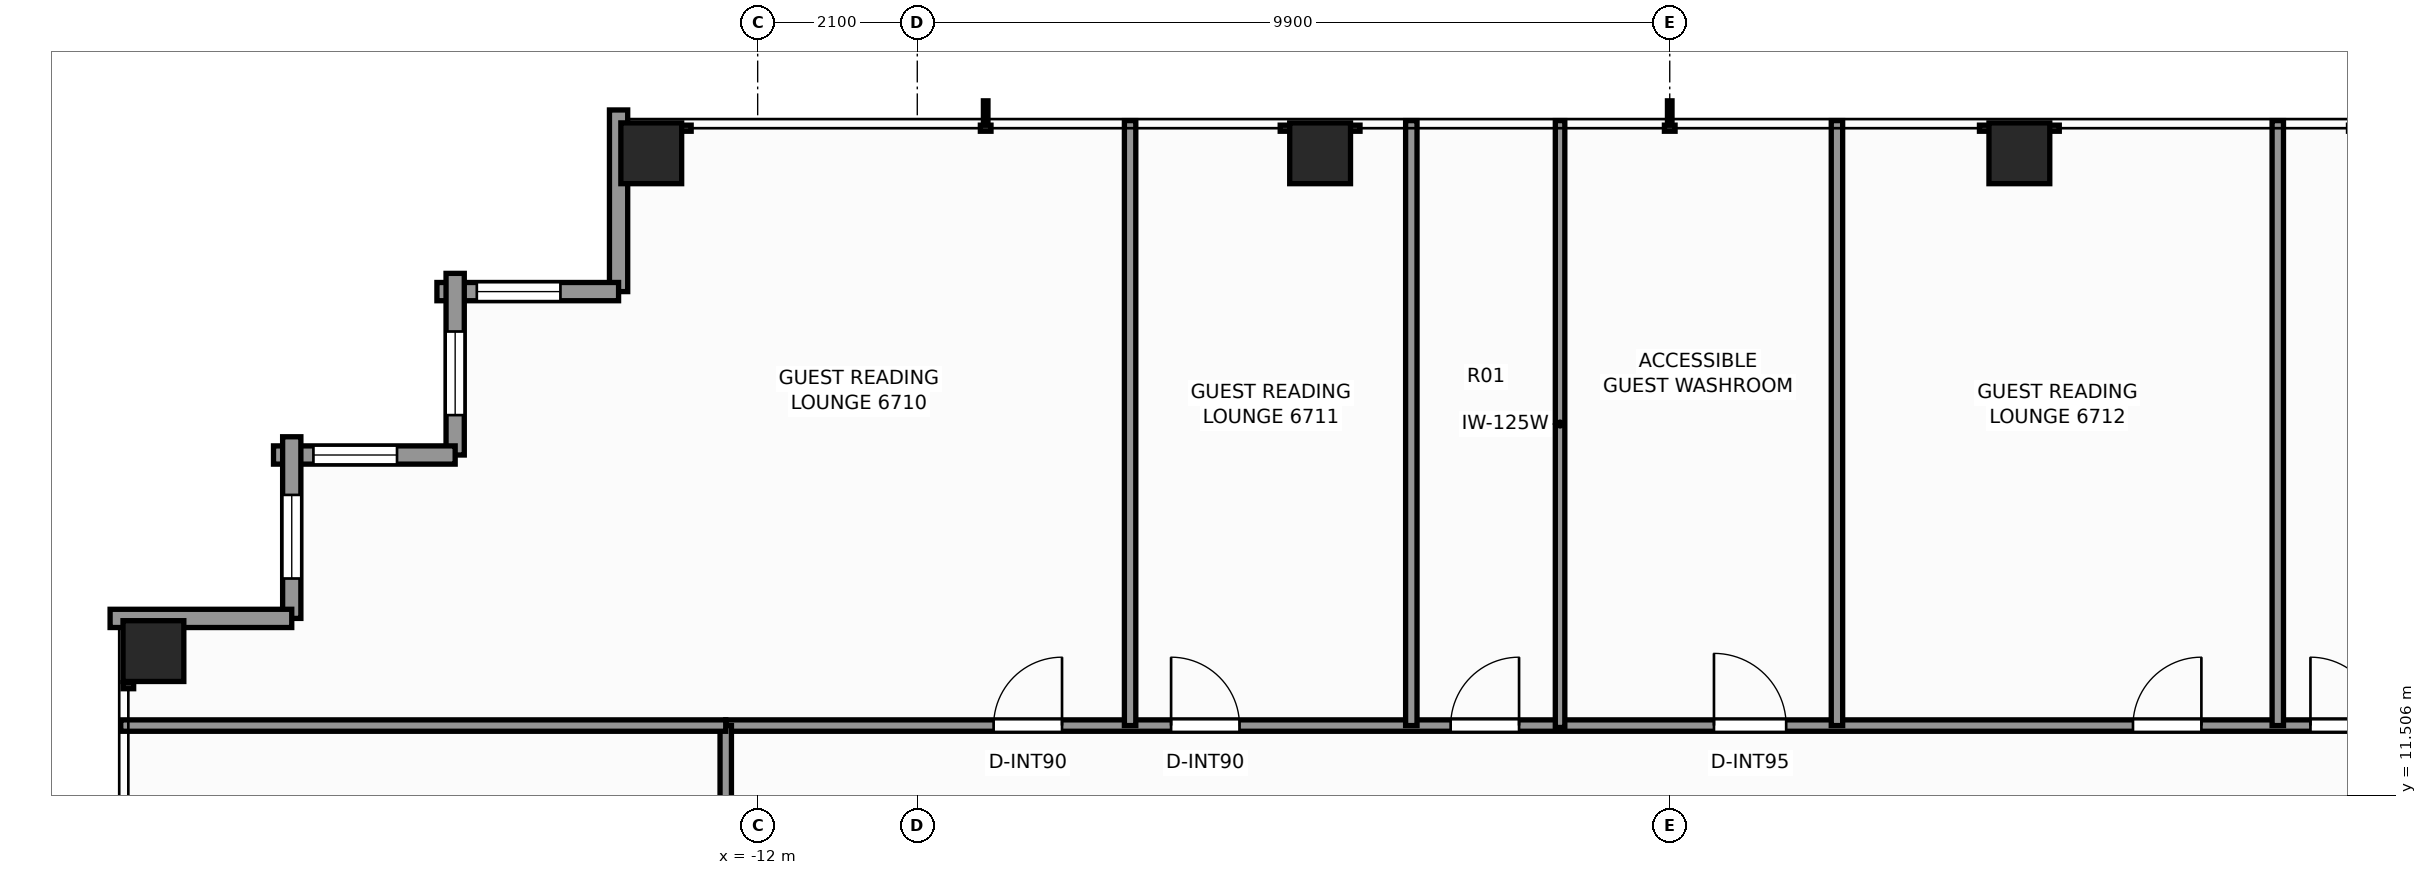
"""IFC4 building model, lengths in metres.
Left out: names, types, materials, properties, quantities, classifications, styles, units other than length and angle.
Written with IfcOpenShell. Run it as: python <this file> out.ifc"""

import sys

from ifc_helpers import new_model, si_unit, direction, frame, frame_2d, origin, origin_2d, place, context, subcontext, project, spatial, rectangle, extrude, element, fill, save


model = new_model("IFC4")
c1 = context("Model", 3, precision=1e-05, world=origin(), true_north=direction((0.0, 1.0)))
c2 = subcontext(c1, "Body", "Model", "MODEL_VIEW")
j1 = project(units=[si_unit("LENGTHUNIT", "METRE"), si_unit("PLANEANGLEUNIT", "RADIAN")], contexts=[c1])
p1 = place(None, origin())
s1 = spatial("IfcSite", under=j1, at=p1, CompositionType="ELEMENT")
p2 = place(p1, origin())
s2 = spatial("IfcBuilding", under=s1, at=p2, CompositionType="ELEMENT")
p3 = place(p2, frame((0.0, 0.0, 229.5)))
s3 = spatial("IfcBuildingStorey", under=s2, at=p3, CompositionType="ELEMENT", Elevation=229.5)
for number, where, z_axis, x_axis in (
    (1, (-13.4, 19.95, 0.0), (0.0, 0.0, 1.0), (1.0, 0.0, 0.0)),
    (2, (-4.6, 19.95, 0.0), (0.0, 0.0, 1.0), (1.0, 0.0, 0.0)),
    (3, (4.6, 19.95, 0.0), (0.0, 0.0, 1.0), (1.0, 0.0, 0.0)),
    (4, (-19.95, 13.4, 0.0), (0.0, 0.0, 1.0), (1.0, 0.0, 0.0)),
):
    element("IfcColumn", number, at=place(p3, frame(where, z_axis=z_axis, x_axis=x_axis)), inside=s3, PredefinedType="COLUMN", context=c2, shape_type="SweptSolid", body=[
        extrude(rectangle(XDim=0.8, YDim=0.8, at=origin_2d()), origin(), (0.0, 0.0, 1.0), 3.3),
    ])
p4 = place(p3, frame((-13.83, 18.13, 0.0), z_axis=(0.0, 0.0, 1.0), x_axis=(0.0, 1.0, 0.0)))
e5 = element("IfcWall", 5, at=p4, inside=s3, PredefinedType="STANDARD", context=c2, shape_type="SweptSolid", body=[
    extrude(rectangle(XDim=2.39, YDim=0.24, at=frame_2d((1.195, 0.0))), origin(), (0.0, 0.0, 1.0), 2.333),
])
p5 = place(p3, frame((-16.22, 18.13, 0.0), z_axis=(0.0, 0.0, 1.0), x_axis=(1.0, 0.0, 0.0)))
e6 = element("IfcWall", 6, at=p5, inside=s3, PredefinedType="STANDARD", context=c2, shape_type="SweptSolid", body=[
    extrude(rectangle(XDim=2.39, YDim=0.24, at=frame_2d((1.195, 0.0))), origin(), (0.0, 0.0, 1.0), 2.333),
])
p6 = place(p5, frame((0.525, 0.0, 0.65)))
e7 = element("IfcOpeningElement", 7, at=p6, cuts=e6, PredefinedType="OPENING", context=c2, shape_type="SweptSolid", body=[
    extrude(rectangle(XDim=1.1, YDim=1.45, at=frame_2d((0.55, 0.725))), frame((0.0, 0.13, 0.0), z_axis=(0.0, -1.0, 0.0), x_axis=(1.0, 0.0, 0.0)), (0.0, 0.0, 1.0), 0.26),
])
p7 = place(p3, frame((-15.98, 15.98, 0.0), z_axis=(0.0, 0.0, 1.0), x_axis=(0.0, 1.0, 0.0)))
e8 = element("IfcWall", 8, at=p7, inside=s3, PredefinedType="STANDARD", context=c2, shape_type="SweptSolid", body=[
    extrude(rectangle(XDim=2.39, YDim=0.24, at=frame_2d((1.195, 0.0))), origin(), (0.0, 0.0, 1.0), 2.333),
])
p8 = place(p7, frame((0.525, 0.0, 0.65)))
e9 = element("IfcOpeningElement", 9, at=p8, cuts=e8, PredefinedType="OPENING", context=c2, shape_type="SweptSolid", body=[
    extrude(rectangle(XDim=1.1, YDim=1.45, at=frame_2d((0.55, 0.725))), frame((0.0, 0.13, 0.0), z_axis=(0.0, -1.0, 0.0), x_axis=(1.0, 0.0, 0.0)), (0.0, 0.0, 1.0), 0.26),
])
p9 = place(p3, frame((-18.37, 15.98, 0.0), z_axis=(0.0, 0.0, 1.0), x_axis=(1.0, 0.0, 0.0)))
e10 = element("IfcWall", 10, at=p9, inside=s3, PredefinedType="STANDARD", context=c2, shape_type="SweptSolid", body=[
    extrude(rectangle(XDim=2.39, YDim=0.24, at=frame_2d((1.195, 0.0))), origin(), (0.0, 0.0, 1.0), 2.333),
])
p10 = place(p9, frame((0.525, 0.0, 0.65)))
e11 = element("IfcOpeningElement", 11, at=p10, cuts=e10, PredefinedType="OPENING", context=c2, shape_type="SweptSolid", body=[
    extrude(rectangle(XDim=1.1, YDim=1.45, at=frame_2d((0.55, 0.725))), frame((0.0, 0.13, 0.0), z_axis=(0.0, -1.0, 0.0), x_axis=(1.0, 0.0, 0.0)), (0.0, 0.0, 1.0), 0.26),
])
p11 = place(p3, frame((-18.13, 13.83, 0.0), z_axis=(0.0, 0.0, 1.0), x_axis=(0.0, 1.0, 0.0)))
e12 = element("IfcWall", 12, at=p11, inside=s3, PredefinedType="STANDARD", context=c2, shape_type="SweptSolid", body=[
    extrude(rectangle(XDim=2.39, YDim=0.24, at=frame_2d((1.195, 0.0))), origin(), (0.0, 0.0, 1.0), 2.333),
])
p12 = place(p11, frame((0.525, 0.0, 0.65)))
e13 = element("IfcOpeningElement", 13, at=p12, cuts=e12, PredefinedType="OPENING", context=c2, shape_type="SweptSolid", body=[
    extrude(rectangle(XDim=1.1, YDim=1.45, at=frame_2d((0.55, 0.725))), frame((0.0, 0.13, 0.0), z_axis=(0.0, -1.0, 0.0), x_axis=(1.0, 0.0, 0.0)), (0.0, 0.0, 1.0), 0.26),
])
p13 = place(p3, frame((-20.52, 13.83, 0.0), z_axis=(0.0, 0.0, 1.0), x_axis=(1.0, 0.0, 0.0)))
e14 = element("IfcWall", 14, at=p13, inside=s3, PredefinedType="STANDARD", context=c2, shape_type="SweptSolid", body=[
    extrude(rectangle(XDim=2.39, YDim=0.24, at=frame_2d((1.195, 0.0))), origin(), (0.0, 0.0, 1.0), 2.333),
])
p14 = place(p3, frame((-12.42, 12.42, 0.0), z_axis=(0.0, 0.0, 1.0), x_axis=(1.0, 0.0, 0.0)))
e15 = element("IfcWall", 15, at=p14, inside=s3, PredefinedType="PARTITIONING", context=c2, shape_type="SweptSolid", body=[
    extrude(rectangle(XDim=24.68, YDim=0.15, at=frame_2d((12.34, 0.0))), origin(), (0.0, 0.0, 1.0), 2.239),
])
p15 = place(p14, frame((3.524, 0.0, 0.0)))
e16 = element("IfcOpeningElement", 16, at=p15, cuts=e15, PredefinedType="OPENING", context=c2, shape_type="SweptSolid", body=[
    extrude(rectangle(XDim=0.9, YDim=2.06, at=frame_2d((0.45, 1.03))), frame((0.0, 0.085, 0.0), z_axis=(0.0, -1.0, 0.0), x_axis=(1.0, 0.0, 0.0)), (0.0, 0.0, 1.0), 0.17),
])
p16 = place(p14, frame((5.859, 0.0, 0.0)))
e17 = element("IfcOpeningElement", 17, at=p16, cuts=e15, PredefinedType="OPENING", context=c2, shape_type="SweptSolid", body=[
    extrude(rectangle(XDim=0.9, YDim=2.06, at=frame_2d((0.45, 1.03))), frame((0.0, 0.085, 0.0), z_axis=(0.0, -1.0, 0.0), x_axis=(1.0, 0.0, 0.0)), (0.0, 0.0, 1.0), 0.17),
])
p17 = place(p14, frame((9.538, 0.0, 0.0)))
e18 = element("IfcOpeningElement", 18, at=p17, cuts=e15, PredefinedType="OPENING", context=c2, shape_type="SweptSolid", body=[
    extrude(rectangle(XDim=0.9, YDim=2.06, at=frame_2d((0.45, 1.03))), frame((0.0, 0.085, 0.0), z_axis=(0.0, -1.0, 0.0), x_axis=(1.0, 0.0, 0.0)), (0.0, 0.0, 1.0), 0.17),
])
p18 = place(p14, frame((13.002, 0.0, 0.0)))
e19 = element("IfcOpeningElement", 19, at=p18, cuts=e15, PredefinedType="OPENING", context=c2, shape_type="SweptSolid", body=[
    extrude(rectangle(XDim=0.95, YDim=2.06, at=frame_2d((0.475, 1.03))), frame((0.0, 0.085, 0.0), z_axis=(0.0, -1.0, 0.0), x_axis=(1.0, 0.0, 0.0)), (0.0, 0.0, 1.0), 0.17),
])
p19 = place(p14, frame((18.515, 0.0, 0.0)))
e20 = element("IfcOpeningElement", 20, at=p19, cuts=e15, PredefinedType="OPENING", context=c2, shape_type="SweptSolid", body=[
    extrude(rectangle(XDim=0.9, YDim=2.06, at=frame_2d((0.45, 1.03))), frame((0.0, 0.085, 0.0), z_axis=(0.0, -1.0, 0.0), x_axis=(1.0, 0.0, 0.0)), (0.0, 0.0, 1.0), 0.17),
])
p20 = place(p14, frame((20.85, 0.0, 0.0)))
e21 = element("IfcOpeningElement", 21, at=p20, cuts=e15, PredefinedType="OPENING", context=c2, shape_type="SweptSolid", body=[
    extrude(rectangle(XDim=0.9, YDim=2.06, at=frame_2d((0.45, 1.03))), frame((0.0, 0.085, 0.0), z_axis=(0.0, -1.0, 0.0), x_axis=(1.0, 0.0, 0.0)), (0.0, 0.0, 1.0), 0.17),
])
p21 = place(p3, frame((-12.42, -12.42, 0.0), z_axis=(0.0, 0.0, 1.0), x_axis=(0.0, 1.0, 0.0)))
e22 = element("IfcWall", 22, at=p21, inside=s3, PredefinedType="PARTITIONING", context=c2, shape_type="SweptSolid", body=[
    extrude(rectangle(XDim=24.84, YDim=0.15, at=frame_2d((12.42, 0.0))), origin(), (0.0, 0.0, 1.0), 2.239),
])
p22 = place(p21, frame((3.137, 0.0, 0.0)))
e23 = element("IfcOpeningElement", 23, at=p22, cuts=e22, PredefinedType="OPENING", context=c2, shape_type="SweptSolid", body=[
    extrude(rectangle(XDim=0.95, YDim=2.06, at=frame_2d((0.475, 1.03))), frame((0.0, 0.085, 0.0), z_axis=(0.0, -1.0, 0.0), x_axis=(1.0, 0.0, 0.0)), (0.0, 0.0, 1.0), 0.17),
])
p23 = place(p21, frame((14.131, 0.0, 0.0)))
e24 = element("IfcOpeningElement", 24, at=p23, cuts=e22, PredefinedType="OPENING", context=c2, shape_type="SweptSolid", body=[
    extrude(rectangle(XDim=0.95, YDim=2.06, at=frame_2d((0.475, 1.03))), frame((0.0, 0.085, 0.0), z_axis=(0.0, -1.0, 0.0), x_axis=(1.0, 0.0, 0.0)), (0.0, 0.0, 1.0), 0.17),
])
p24 = place(p21, frame((20.952, 0.0, 0.0)))
e25 = element("IfcOpeningElement", 25, at=p24, cuts=e22, PredefinedType="OPENING", context=c2, shape_type="SweptSolid", body=[
    extrude(rectangle(XDim=0.95, YDim=2.06, at=frame_2d((0.475, 1.03))), frame((0.0, 0.085, 0.0), z_axis=(0.0, -1.0, 0.0), x_axis=(1.0, 0.0, 0.0)), (0.0, 0.0, 1.0), 0.17),
])
p25 = place(p3, frame((-20.38, 12.42, 0.0), z_axis=(0.0, 0.0, 1.0), x_axis=(1.0, 0.0, 0.0)))
e26 = element("IfcWall", 26, at=p25, inside=s3, PredefinedType="PARTITIONING", context=c2, shape_type="SweptSolid", body=[
    extrude(rectangle(XDim=7.96, YDim=0.15, at=frame_2d((3.98, 0.0))), origin(), (0.0, 0.0, 1.0), 2.239),
])
for number, where, z_axis, x_axis in (
    (27, (-7.1, 12.42, 0.0), (0.0, 0.0, 1.0), (0.0, 1.0, 0.0)),
    (28, (-3.4, 12.42, 0.0), (0.0, 0.0, 1.0), (0.0, 1.0, 0.0)),
    (29, (2.2, 12.42, 0.0), (0.0, 0.0, 1.0), (0.0, 1.0, 0.0)),
):
    element("IfcWall", number, at=place(p3, frame(where, z_axis=z_axis, x_axis=x_axis)), inside=s3, PredefinedType="PARTITIONING", context=c2, shape_type="SweptSolid", body=[
        extrude(rectangle(XDim=7.96, YDim=0.15, at=frame_2d((3.98, 0.0))), origin(), (0.0, 0.0, 1.0), 2.323),
    ])
p26 = place(p3, frame((-1.443, 12.395, 0.0), z_axis=(0.0, 0.0, 1.0), x_axis=(0.0, 1.0, 0.0)))
e30 = element("IfcWall", 30, at=p26, inside=s3, PredefinedType="PARTITIONING", context=c2, shape_type="SweptSolid", body=[
    extrude(rectangle(XDim=7.985, YDim=0.125, at=frame_2d((3.992, 0.0))), origin(), (0.0, 0.0, 1.0), 2.323),
])
p27 = place(p3, frame((8.0, 12.42, 0.0), z_axis=(0.0, 0.0, 1.0), x_axis=(0.0, 1.0, 0.0)))
e31 = element("IfcWall", 31, at=p27, inside=s3, PredefinedType="PARTITIONING", context=c2, shape_type="SweptSolid", body=[
    extrude(rectangle(XDim=7.96, YDim=0.15, at=frame_2d((3.98, 0.0))), origin(), (0.0, 0.0, 1.0), 2.323),
])
p28 = place(p6, origin())
e32 = element("IfcWindow", 32, at=p28, inside=s3, PartitioningType="SINGLE_PANEL", PredefinedType="WINDOW", context=c2, shape_type="SweptSolid", body=[
    extrude(rectangle(XDim=1.1, YDim=1.45, at=frame_2d((0.55, 0.725))), frame((0.0, 0.03, 0.0), z_axis=(0.0, -1.0, 0.0), x_axis=(1.0, 0.0, 0.0)), (0.0, 0.0, 1.0), 0.06),
])
fill(e7, e32)
p29 = place(p8, origin())
e33 = element("IfcWindow", 33, at=p29, inside=s3, PartitioningType="SINGLE_PANEL", PredefinedType="WINDOW", context=c2, shape_type="SweptSolid", body=[
    extrude(rectangle(XDim=1.1, YDim=1.45, at=frame_2d((0.55, 0.725))), frame((0.0, 0.03, 0.0), z_axis=(0.0, -1.0, 0.0), x_axis=(1.0, 0.0, 0.0)), (0.0, 0.0, 1.0), 0.06),
])
fill(e9, e33)
p30 = place(p10, origin())
e34 = element("IfcWindow", 34, at=p30, inside=s3, PartitioningType="SINGLE_PANEL", PredefinedType="WINDOW", context=c2, shape_type="SweptSolid", body=[
    extrude(rectangle(XDim=1.1, YDim=1.45, at=frame_2d((0.55, 0.725))), frame((0.0, 0.03, 0.0), z_axis=(0.0, -1.0, 0.0), x_axis=(1.0, 0.0, 0.0)), (0.0, 0.0, 1.0), 0.06),
])
fill(e11, e34)
p31 = place(p12, origin())
e35 = element("IfcWindow", 35, at=p31, inside=s3, PartitioningType="SINGLE_PANEL", PredefinedType="WINDOW", context=c2, shape_type="SweptSolid", body=[
    extrude(rectangle(XDim=1.1, YDim=1.45, at=frame_2d((0.55, 0.725))), frame((0.0, 0.03, 0.0), z_axis=(0.0, -1.0, 0.0), x_axis=(1.0, 0.0, 0.0)), (0.0, 0.0, 1.0), 0.06),
])
fill(e13, e35)
p32 = place(p15, origin())
e36 = element("IfcDoor", 36, at=p32, inside=s3, OperationType="SINGLE_SWING_RIGHT", PredefinedType="DOOR", context=c2, shape_type="SweptSolid", body=[
    extrude(rectangle(XDim=0.9, YDim=2.06, at=frame_2d((0.45, 1.03))), frame((0.0, 0.025, 0.0), z_axis=(0.0, -1.0, 0.0), x_axis=(1.0, 0.0, 0.0)), (0.0, 0.0, 1.0), 0.05),
])
fill(e16, e36)
p33 = place(p16, origin())
e37 = element("IfcDoor", 37, at=p33, inside=s3, OperationType="SINGLE_SWING_LEFT", PredefinedType="DOOR", context=c2, shape_type="SweptSolid", body=[
    extrude(rectangle(XDim=0.9, YDim=2.06, at=frame_2d((0.45, 1.03))), frame((0.0, 0.025, 0.0), z_axis=(0.0, -1.0, 0.0), x_axis=(1.0, 0.0, 0.0)), (0.0, 0.0, 1.0), 0.05),
])
fill(e17, e37)
p34 = place(p17, origin())
e38 = element("IfcDoor", 38, at=p34, inside=s3, OperationType="SINGLE_SWING_RIGHT", PredefinedType="DOOR", context=c2, shape_type="SweptSolid", body=[
    extrude(rectangle(XDim=0.9, YDim=2.06, at=frame_2d((0.45, 1.03))), frame((0.0, 0.025, 0.0), z_axis=(0.0, -1.0, 0.0), x_axis=(1.0, 0.0, 0.0)), (0.0, 0.0, 1.0), 0.05),
])
fill(e18, e38)
p35 = place(p18, origin())
e39 = element("IfcDoor", 39, at=p35, inside=s3, OperationType="SINGLE_SWING_LEFT", PredefinedType="DOOR", context=c2, shape_type="SweptSolid", body=[
    extrude(rectangle(XDim=0.95, YDim=2.06, at=frame_2d((0.475, 1.03))), frame((0.0, 0.025, 0.0), z_axis=(0.0, -1.0, 0.0), x_axis=(1.0, 0.0, 0.0)), (0.0, 0.0, 1.0), 0.05),
])
fill(e19, e39)
p36 = place(p19, origin())
e40 = element("IfcDoor", 40, at=p36, inside=s3, OperationType="SINGLE_SWING_RIGHT", PredefinedType="DOOR", context=c2, shape_type="SweptSolid", body=[
    extrude(rectangle(XDim=0.9, YDim=2.06, at=frame_2d((0.45, 1.03))), frame((0.0, 0.025, 0.0), z_axis=(0.0, -1.0, 0.0), x_axis=(1.0, 0.0, 0.0)), (0.0, 0.0, 1.0), 0.05),
])
fill(e20, e40)
p37 = place(p20, origin())
e41 = element("IfcDoor", 41, at=p37, inside=s3, OperationType="SINGLE_SWING_LEFT", PredefinedType="DOOR", context=c2, shape_type="SweptSolid", body=[
    extrude(rectangle(XDim=0.9, YDim=2.06, at=frame_2d((0.45, 1.03))), frame((0.0, 0.025, 0.0), z_axis=(0.0, -1.0, 0.0), x_axis=(1.0, 0.0, 0.0)), (0.0, 0.0, 1.0), 0.05),
])
fill(e21, e41)
save(model, sys.argv[1])
